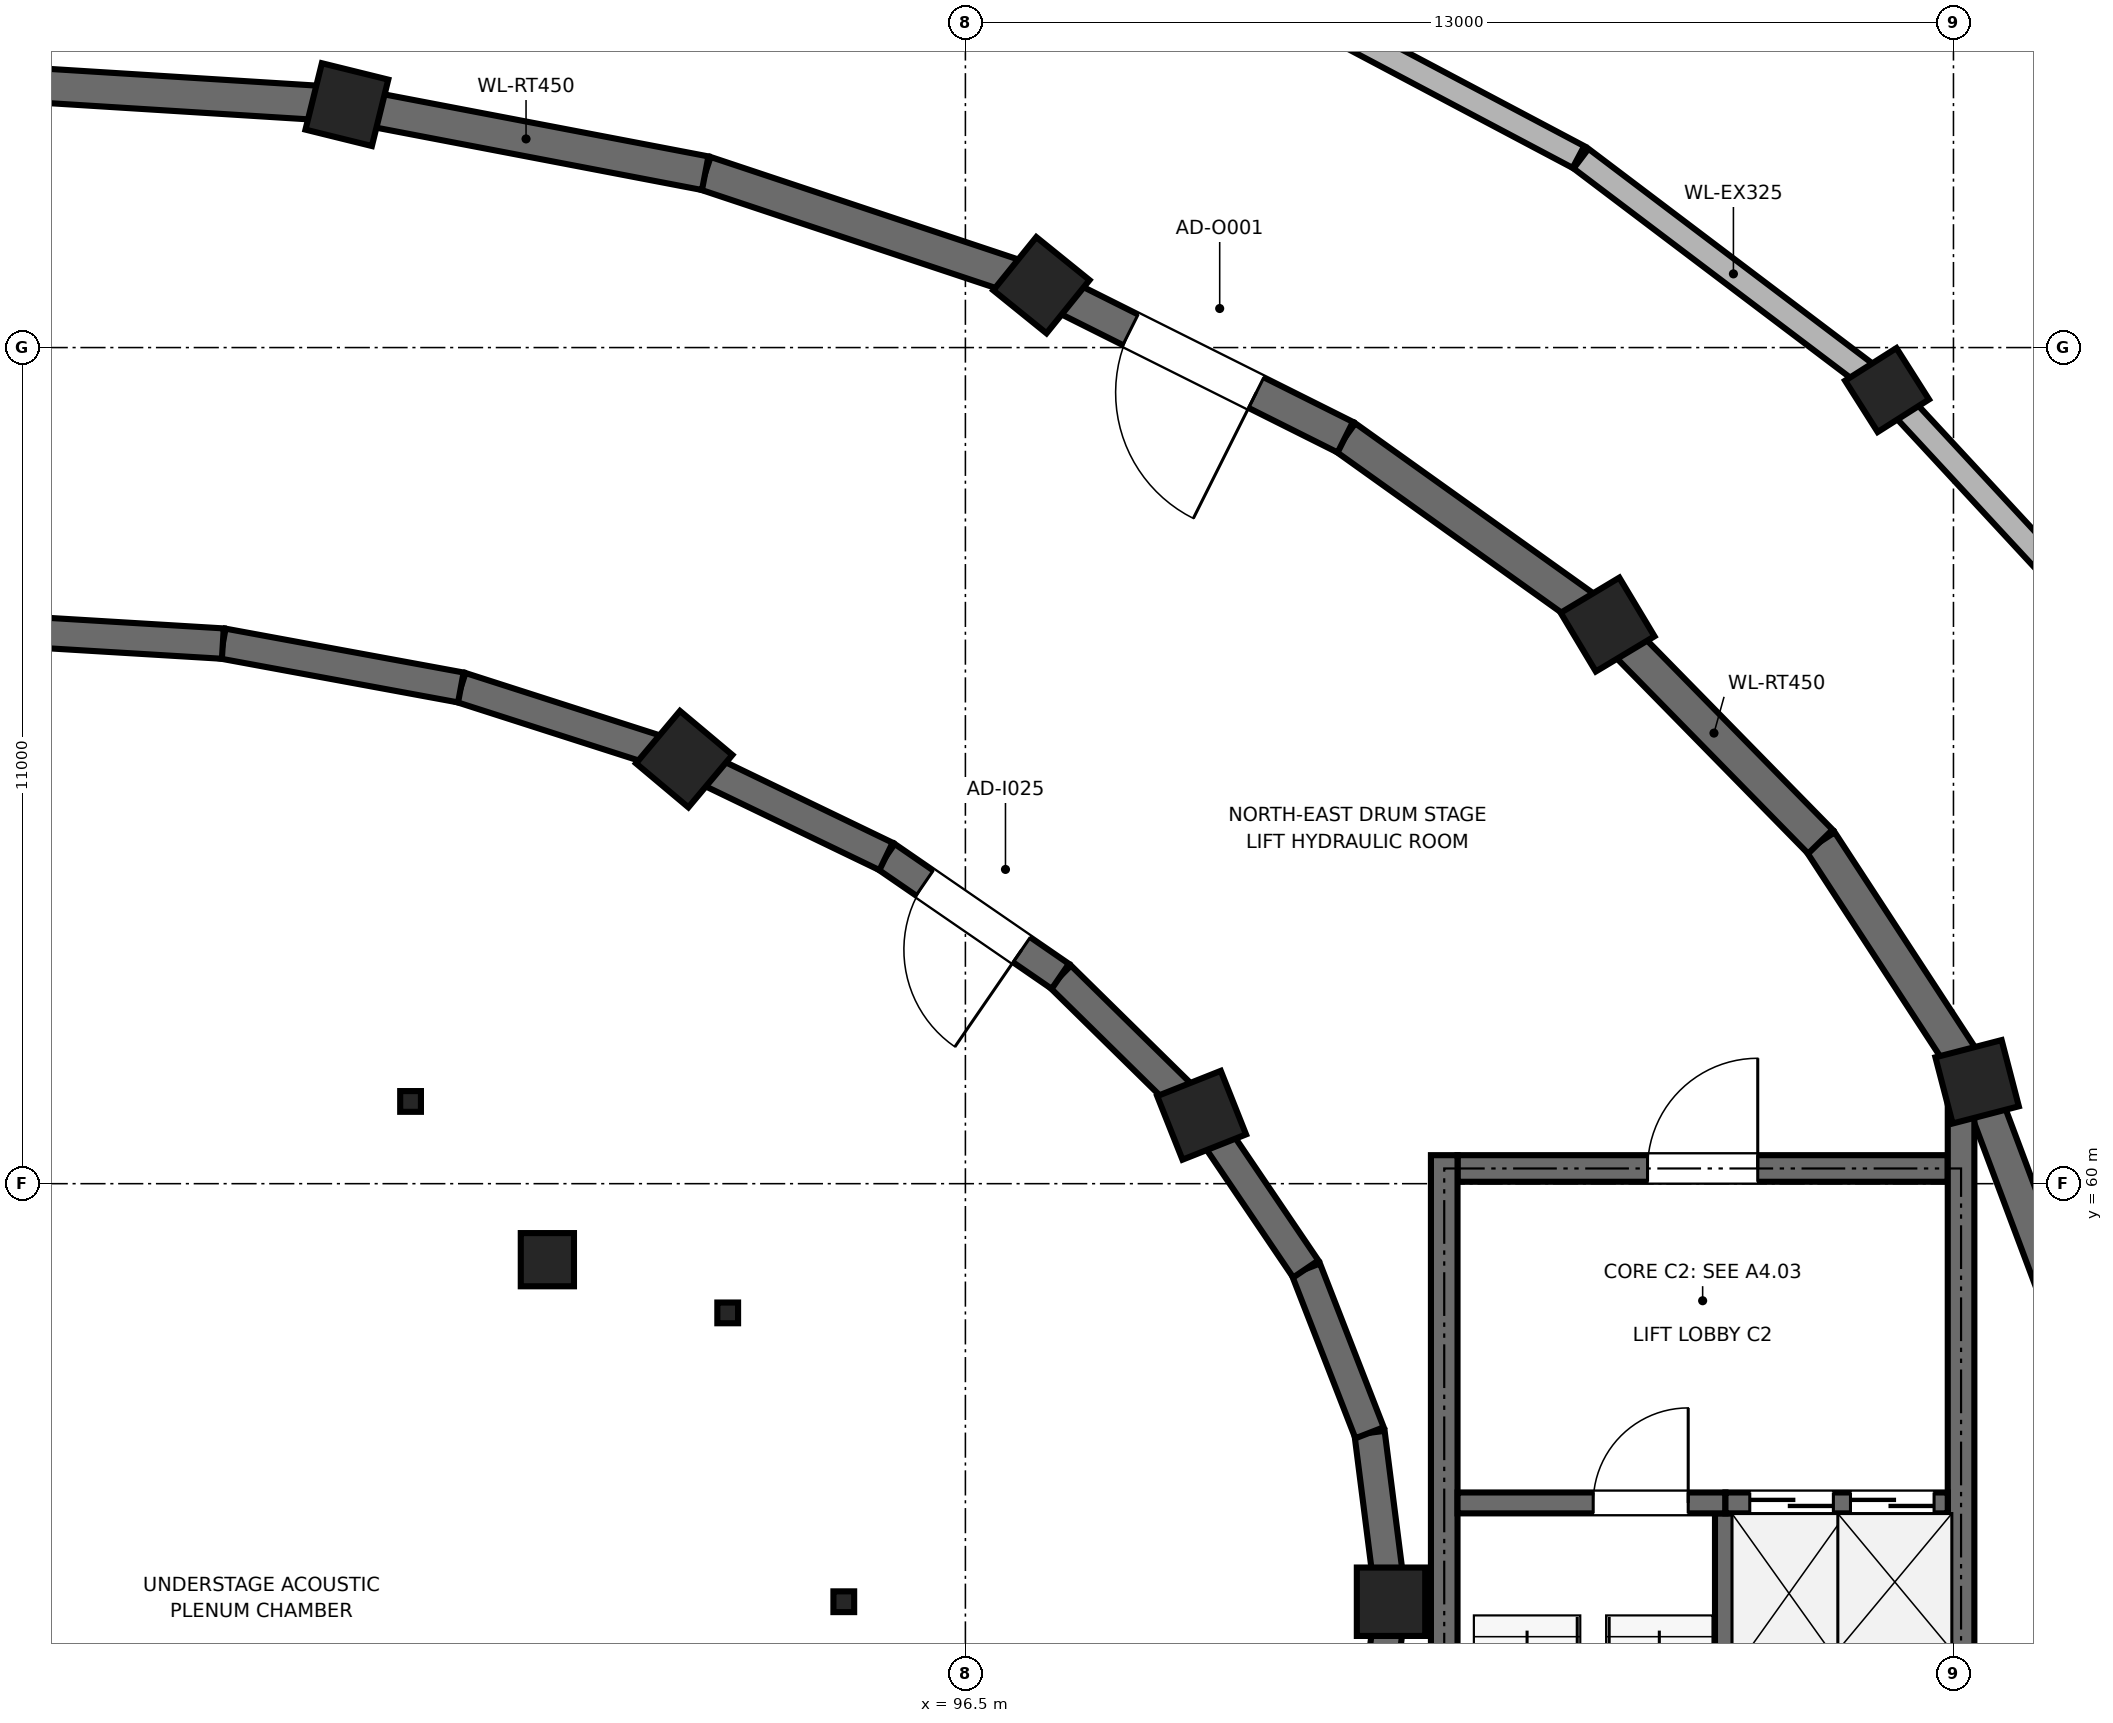
"""IFC4 building model, lengths in metres.
Left out: names, types, materials, properties, quantities, classifications, styles, units other than length and angle.
Written with IfcOpenShell. Run it as: python <this file> out.ifc"""

import sys

from ifc_helpers import new_model, si_unit, direction, frame, frame_2d, origin, origin_2d, place, context, subcontext, project, spatial, rectangle, circle, hollow_circle, extrude, element, fill, save


model = new_model("IFC4")
c1 = context("Model", 3, precision=1e-05, world=origin(), true_north=direction((0.0, 1.0)))
c2 = subcontext(c1, "Body", "Model", "MODEL_VIEW")
j1 = project(units=[si_unit("LENGTHUNIT", "METRE"), si_unit("PLANEANGLEUNIT", "RADIAN")], contexts=[c1])
p1 = place(None, origin())
s1 = spatial("IfcSite", under=j1, at=p1, CompositionType="ELEMENT")
p2 = place(p1, origin())
s2 = spatial("IfcBuilding", under=s1, at=p2, CompositionType="ELEMENT")
p3 = place(p2, frame((0.0, 0.0, -4.8)))
s3 = spatial("IfcBuildingStorey", under=s2, at=p3, CompositionType="ELEMENT", Elevation=-4.8)
p4 = place(p3, frame((108.626, 70.441, 0.0), z_axis=(0.0, 0.0, 1.0), x_axis=(0.84442143206, 0.535679423796, 0.0)))
e1 = element("IfcColumn", 1, at=p4, inside=s3, PredefinedType="COLUMN", context=c2, shape_type="SweptSolid", body=[
    extrude(circle(Radius=0.4, at=origin_2d()), origin(), (0.0, 0.0, 1.0), 4.8),
])
for number, where, z_axis, x_axis in (
    (2, (109.811, 61.34, 0.0), (0.0, 0.0, 1.0), (0.968, 0.252, 0.0)),
    (3, (104.949, 67.356, 0.0), (0.0, 0.0, 1.0), (0.858, 0.514, 0.0)),
    (4, (97.5, 71.821, 0.0), (0.0, 0.0, 1.0), (0.629, 0.778, 0.0)),
    (5, (88.362, 74.196, 0.0), (0.0, 0.0, 1.0), (0.24, 0.971, 0.0)),
):
    element("IfcColumn", number, at=place(p3, frame(where, z_axis=z_axis, x_axis=x_axis)), inside=s3, PredefinedType="COLUMN", context=c2, shape_type="SweptSolid", body=[
        extrude(rectangle(XDim=0.9, YDim=0.9, at=origin_2d()), origin(), (0.0, 0.0, 1.0), 4.8),
    ])
for number, where, z_axis, x_axis in (
    (6, (102.1, 54.5, 0.0), (0.0, 0.0, 1.0), (1.0, 0.0, 0.0)),
    (7, (99.608, 60.9, 0.0), (0.0, 0.0, 1.0), (0.929, 0.369, 0.0)),
    (8, (92.8, 65.585, 0.0), (0.0, 0.0, 1.0), (0.643, 0.766, 0.0)),
):
    element("IfcColumn", number, at=place(p3, frame(where, z_axis=z_axis, x_axis=x_axis)), inside=s3, PredefinedType="COLUMN", context=c2, shape_type="SweptSolid", body=[
        extrude(circle(Radius=0.45, at=origin_2d()), origin(), (0.0, 0.0, 1.0), 4.8),
    ])
p5 = place(p3, frame((91.0, 59.0, 0.0), z_axis=(0.0, 0.0, 1.0), x_axis=(1.0, 0.0, 0.0)))
e9 = element("IfcColumn", 9, at=p5, inside=s3, PredefinedType="COLUMN", context=c2, shape_type="SweptSolid", body=[
    extrude(rectangle(XDim=0.7, YDim=0.7, at=origin_2d()), origin(), (0.0, 0.0, 1.0), 4.8),
])
p6 = place(p3, frame((111.075, 57.973, 0.0), z_axis=(0.0, 0.0, 1.0), x_axis=(-0.351279653979, 0.936270583058, 0.0)))
e10 = element("IfcWall", 10, at=p6, inside=s3, PredefinedType="SHEAR", context=c2, shape_type="SweptSolid", body=[
    extrude(rectangle(XDim=3.597, YDim=0.45, at=frame_2d((1.798, 0.0))), origin(), (0.0, 0.0, 1.0), 4.5),
])
p7 = place(p3, frame((109.811, 61.34, 0.0), z_axis=(0.0, 0.0, 1.0), x_axis=(-0.546611158382, 0.837386554425, 0.0)))
e11 = element("IfcWall", 11, at=p7, inside=s3, PredefinedType="SHEAR", context=c2, shape_type="SweptSolid", body=[
    extrude(rectangle(XDim=3.773, YDim=0.45, at=frame_2d((1.887, 0.0))), origin(), (0.0, 0.0, 1.0), 4.5),
])
p8 = place(p3, frame((107.749, 64.5, 0.0), z_axis=(0.0, 0.0, 1.0), x_axis=(-0.700051268358, 0.714092586203, 0.0)))
e12 = element("IfcWall", 12, at=p8, inside=s3, PredefinedType="SHEAR", context=c2, shape_type="SweptSolid", body=[
    extrude(rectangle(XDim=3.999, YDim=0.45, at=frame_2d((2.0, 0.0))), origin(), (0.0, 0.0, 1.0), 4.5),
])
p9 = place(p3, frame((104.949, 67.356, 0.0), z_axis=(0.0, 0.0, 1.0), x_axis=(-0.813737360708, 0.581232748378, 0.0)))
e13 = element("IfcWall", 13, at=p9, inside=s3, PredefinedType="SHEAR", context=c2, shape_type="SweptSolid", body=[
    extrude(rectangle(XDim=4.241, YDim=0.45, at=frame_2d((2.121, 0.0))), origin(), (0.0, 0.0, 1.0), 4.5),
])
p10 = place(p3, frame((101.498, 69.821, 0.0), z_axis=(0.0, 0.0, 1.0), x_axis=(-0.894361644392, 0.447344664705, 0.0)))
e14 = element("IfcWall", 14, at=p10, inside=s3, PredefinedType="SHEAR", context=c2, shape_type="SweptSolid", body=[
    extrude(rectangle(XDim=4.47, YDim=0.45, at=frame_2d((2.235, 0.0))), origin(), (0.0, 0.0, 1.0), 4.5),
])
p11 = place(p10, frame((1.31, 0.0, 0.0)))
e15 = element("IfcOpeningElement", 15, at=p11, cuts=e14, PredefinedType="OPENING", context=c2, shape_type="SweptSolid", body=[
    extrude(rectangle(XDim=1.85, YDim=2.3, at=frame_2d((0.925, 1.15))), frame((0.0, 0.235, 0.0), z_axis=(0.0, -1.0, 0.0), x_axis=(1.0, 0.0, 0.0)), (0.0, 0.0, 1.0), 0.47),
])
p12 = place(p3, frame((97.5, 71.821, 0.0), z_axis=(0.0, 0.0, 1.0), x_axis=(-0.948751350732, 0.316023534699, 0.0)))
e16 = element("IfcWall", 16, at=p12, inside=s3, PredefinedType="SHEAR", context=c2, shape_type="SweptSolid", body=[
    extrude(rectangle(XDim=4.662, YDim=0.45, at=frame_2d((2.331, 0.0))), origin(), (0.0, 0.0, 1.0), 4.5),
])
p13 = place(p3, frame((93.077, 73.294, 0.0), z_axis=(0.0, 0.0, 1.0), x_axis=(-0.982172578083, 0.187981453503, 0.0)))
e17 = element("IfcWall", 17, at=p13, inside=s3, PredefinedType="SHEAR", context=c2, shape_type="SweptSolid", body=[
    extrude(rectangle(XDim=4.8, YDim=0.45, at=frame_2d((2.4, 0.0))), origin(), (0.0, 0.0, 1.0), 4.5),
])
p14 = place(p3, frame((88.362, 74.196, 0.0), z_axis=(0.0, 0.0, 1.0), x_axis=(-0.998054722924, 0.06234396562, 0.0)))
e18 = element("IfcWall", 18, at=p14, inside=s3, PredefinedType="SHEAR", context=c2, shape_type="SweptSolid", body=[
    extrude(rectangle(XDim=4.872, YDim=0.45, at=frame_2d((2.436, 0.0))), origin(), (0.0, 0.0, 1.0), 4.5),
])
p15 = place(p3, frame((102.1, 54.5, 0.0), z_axis=(0.0, 0.0, 1.0), x_axis=(-0.126180195213, 0.992007337844, 0.0)))
e19 = element("IfcWall", 19, at=p15, inside=s3, PredefinedType="SOLIDWALL", context=c2, shape_type="SweptSolid", body=[
    extrude(rectangle(XDim=2.24, YDim=0.4, at=frame_2d((1.12, 0.0))), origin(), (0.0, 0.0, 1.0), 4.5),
])
p16 = place(p3, frame((101.817, 56.723, 0.0), z_axis=(0.0, 0.0, 1.0), x_axis=(-0.362802811216, 0.931865934657, 0.0)))
e20 = element("IfcWall", 20, at=p16, inside=s3, PredefinedType="SOLIDWALL", context=c2, shape_type="SweptSolid", body=[
    extrude(rectangle(XDim=2.313, YDim=0.4, at=frame_2d((1.156, 0.0))), origin(), (0.0, 0.0, 1.0), 4.5),
])
p17 = place(p3, frame((100.978, 58.878, 0.0), z_axis=(0.0, 0.0, 1.0), x_axis=(-0.560958648975, 0.827843822312, 0.0)))
e21 = element("IfcWall", 21, at=p17, inside=s3, PredefinedType="SOLIDWALL", context=c2, shape_type="SweptSolid", body=[
    extrude(rectangle(XDim=2.442, YDim=0.4, at=frame_2d((1.221, 0.0))), origin(), (0.0, 0.0, 1.0), 4.5),
])
p18 = place(p3, frame((99.608, 60.9, 0.0), z_axis=(0.0, 0.0, 1.0), x_axis=(-0.713212431679, 0.700947949065, 0.0)))
e22 = element("IfcWall", 22, at=p18, inside=s3, PredefinedType="SOLIDWALL", context=c2, shape_type="SweptSolid", body=[
    extrude(rectangle(XDim=2.608, YDim=0.4, at=frame_2d((1.304, 0.0))), origin(), (0.0, 0.0, 1.0), 4.5),
])
p19 = place(p3, frame((97.748, 62.728, 0.0), z_axis=(0.0, 0.0, 1.0), x_axis=(-0.823780742291, 0.566908536388, 0.0)))
e23 = element("IfcWall", 23, at=p19, inside=s3, PredefinedType="SOLIDWALL", context=c2, shape_type="SweptSolid", body=[
    extrude(rectangle(XDim=2.783, YDim=0.4, at=frame_2d((1.392, 0.0))), origin(), (0.0, 0.0, 1.0), 4.5),
])
p20 = place(p19, frame((0.616, 0.0, 0.0)))
e24 = element("IfcOpeningElement", 24, at=p20, cuts=e23, PredefinedType="OPENING", context=c2, shape_type="SweptSolid", body=[
    extrude(rectangle(XDim=1.55, YDim=2.18, at=frame_2d((0.775, 1.09))), frame((0.0, 0.21, 0.0), z_axis=(0.0, -1.0, 0.0), x_axis=(1.0, 0.0, 0.0)), (0.0, 0.0, 1.0), 0.42),
])
p21 = place(p3, frame((95.456, 64.305, 0.0), z_axis=(0.0, 0.0, 1.0), x_axis=(-0.900857755122, 0.434114391648, 0.0)))
e25 = element("IfcWall", 25, at=p21, inside=s3, PredefinedType="SOLIDWALL", context=c2, shape_type="SweptSolid", body=[
    extrude(rectangle(XDim=2.948, YDim=0.4, at=frame_2d((1.474, 0.0))), origin(), (0.0, 0.0, 1.0), 4.5),
])
p22 = place(p3, frame((92.8, 65.585, 0.0), z_axis=(0.0, 0.0, 1.0), x_axis=(-0.952183186678, 0.305527705795, 0.0)))
e26 = element("IfcWall", 26, at=p22, inside=s3, PredefinedType="SOLIDWALL", context=c2, shape_type="SweptSolid", body=[
    extrude(rectangle(XDim=3.086, YDim=0.4, at=frame_2d((1.543, 0.0))), origin(), (0.0, 0.0, 1.0), 4.5),
])
p23 = place(p3, frame((89.862, 66.528, 0.0), z_axis=(0.0, 0.0, 1.0), x_axis=(-0.9834240594, 0.18132048807, 0.0)))
e27 = element("IfcWall", 27, at=p23, inside=s3, PredefinedType="SOLIDWALL", context=c2, shape_type="SweptSolid", body=[
    extrude(rectangle(XDim=3.184, YDim=0.4, at=frame_2d((1.592, 0.0))), origin(), (0.0, 0.0, 1.0), 4.5),
])
p24 = place(p3, frame((86.73, 67.105, 0.0), z_axis=(0.0, 0.0, 1.0), x_axis=(-0.99819038223, 0.060132859761, 0.0)))
e28 = element("IfcWall", 28, at=p24, inside=s3, PredefinedType="SOLIDWALL", context=c2, shape_type="SweptSolid", body=[
    extrude(rectangle(XDim=3.236, YDim=0.4, at=frame_2d((1.618, 0.0))), origin(), (0.0, 0.0, 1.0), 4.5),
])
p25 = place(p3, frame((101.817, 52.277, 0.0), z_axis=(0.0, 0.0, 1.0), x_axis=(0.126180195213, 0.992007337844, 0.0)))
e29 = element("IfcWall", 29, at=p25, inside=s3, PredefinedType="SOLIDWALL", context=c2, shape_type="SweptSolid", body=[
    extrude(rectangle(XDim=2.24, YDim=0.4, at=frame_2d((1.12, 0.0))), origin(), (0.0, 0.0, 1.0), 4.5),
])
for number, where, z_axis, x_axis in (
    (30, (94.9, 54.5, 0.0), (0.0, 0.0, 1.0), (1.0, 0.0, 0.0)),
    (31, (93.373, 58.3, 0.0), (0.0, 0.0, 1.0), (1.0, 0.0, 0.0)),
    (32, (89.2, 61.082, 0.0), (0.0, 0.0, 1.0), (1.0, 0.0, 0.0)),
):
    element("IfcColumn", number, at=place(p3, frame(where, z_axis=z_axis, x_axis=x_axis)), inside=s3, PredefinedType="COLUMN", context=c2, shape_type="SweptSolid", body=[
        extrude(hollow_circle(Radius=0.136, WallThickness=0.016, at=origin_2d()), origin(), (0.0, 0.0, 1.0), 4.8),
    ])
p26 = place(p3, frame((108.64, 70.427, 0.0), z_axis=(0.0, 0.0, 1.0), x_axis=(0.679476177226, -0.733697570244, 0.0)))
e33 = element("IfcWall", 33, at=p26, inside=s3, PredefinedType="SOLIDWALL", context=c2, shape_type="SweptSolid", body=[
    extrude(rectangle(XDim=4.786, YDim=0.325, at=frame_2d((2.393, 0.0))), origin(), (0.0, 0.0, 1.0), 3.95),
])
p27 = place(p3, frame((104.599, 73.486, 0.0), z_axis=(0.0, 0.0, 1.0), x_axis=(0.797657622226, -0.60311053523, 0.0)))
e34 = element("IfcWall", 34, at=p27, inside=s3, PredefinedType="SOLIDWALL", context=c2, shape_type="SweptSolid", body=[
    extrude(rectangle(XDim=5.029, YDim=0.325, at=frame_2d((2.514, 0.0))), origin(), (0.0, 0.0, 1.0), 3.95),
])
p28 = place(p3, frame((99.918, 75.968, 0.0), z_axis=(0.0, 0.0, 1.0), x_axis=(0.883786787155, -0.467889853332, 0.0)))
e35 = element("IfcWall", 35, at=p28, inside=s3, PredefinedType="SOLIDWALL", context=c2, shape_type="SweptSolid", body=[
    extrude(rectangle(XDim=5.259, YDim=0.325, at=frame_2d((2.629, 0.0))), origin(), (0.0, 0.0, 1.0), 3.95),
])
p29 = place(p3, frame((102.975, 60.2, 0.0), z_axis=(0.0, 0.0, 1.0), x_axis=(1.0, 0.0, 0.0)))
e36 = element("IfcWall", 36, at=p29, inside=s3, PredefinedType="SHEAR", context=c2, shape_type="SweptSolid", body=[
    extrude(rectangle(XDim=6.45, YDim=0.35, at=frame_2d((3.225, 0.0))), origin(), (0.0, 0.0, 1.0), 4.5),
])
p30 = place(p29, frame((2.5, 0.0, 0.0)))
e37 = element("IfcOpeningElement", 37, at=p30, cuts=e36, PredefinedType="OPENING", context=c2, shape_type="SweptSolid", body=[
    extrude(rectangle(XDim=1.45, YDim=2.2, at=frame_2d((0.725, 1.1))), frame((0.0, 0.185, 0.0), z_axis=(0.0, -1.0, 0.0), x_axis=(1.0, 0.0, 0.0)), (0.0, 0.0, 1.0), 0.37),
])
p31 = place(p3, frame((102.8, 48.775, 0.0), z_axis=(0.0, 0.0, 1.0), x_axis=(0.0, 1.0, 0.0)))
e38 = element("IfcWall", 38, at=p31, inside=s3, PredefinedType="SHEAR", context=c2, shape_type="SweptSolid", body=[
    extrude(rectangle(XDim=11.6, YDim=0.35, at=frame_2d((5.8, 0.0))), origin(), (0.0, 0.0, 1.0), 4.5),
])
p32 = place(p3, frame((109.6, 48.775, 0.0), z_axis=(0.0, 0.0, 1.0), x_axis=(0.0, 1.0, 0.0)))
e39 = element("IfcWall", 39, at=p32, inside=s3, PredefinedType="SHEAR", context=c2, shape_type="SweptSolid", body=[
    extrude(rectangle(XDim=12.565, YDim=0.35, at=frame_2d((6.283, 0.0))), origin(), (0.0, 0.0, 1.0), 4.5),
])
p33 = place(p3, frame((106.5, 48.775, 0.0), z_axis=(0.0, 0.0, 1.0), x_axis=(0.0, 1.0, 0.0)))
e40 = element("IfcWall", 40, at=p33, inside=s3, PredefinedType="SHEAR", context=c2, shape_type="SweptSolid", body=[
    extrude(rectangle(XDim=6.888, YDim=0.275, at=frame_2d((3.444, 0.0))), origin(), (0.0, 0.0, 1.0), 4.5),
])
p34 = place(p3, frame((102.975, 55.8, 0.0), z_axis=(0.0, 0.0, 1.0), x_axis=(1.0, 0.0, 0.0)))
e41 = element("IfcWall", 41, at=p34, inside=s3, PredefinedType="SHEAR", context=c2, shape_type="SweptSolid", body=[
    extrude(rectangle(XDim=3.525, YDim=0.275, at=frame_2d((1.762, 0.0))), origin(), (0.0, 0.0, 1.0), 4.5),
])
p35 = place(p34, frame((1.785, 0.0, 0.0)))
e42 = element("IfcOpeningElement", 42, at=p35, cuts=e41, PredefinedType="OPENING", context=c2, shape_type="SweptSolid", body=[
    extrude(rectangle(XDim=1.25, YDim=2.15, at=frame_2d((0.625, 1.075))), frame((0.0, 0.147, 0.0), z_axis=(0.0, -1.0, 0.0), x_axis=(1.0, 0.0, 0.0)), (0.0, 0.0, 1.0), 0.295),
])
p36 = place(p3, frame((106.5, 55.8, 0.0), z_axis=(0.0, 0.0, 1.0), x_axis=(1.0, 0.0, 0.0)))
e43 = element("IfcWall", 43, at=p36, inside=s3, PredefinedType="SHEAR", context=c2, shape_type="SweptSolid", body=[
    extrude(rectangle(XDim=2.925, YDim=0.275, at=frame_2d((1.462, 0.0))), origin(), (0.0, 0.0, 1.0), 4.5),
])
p37 = place(p36, frame((0.32, 0.0, 0.0)))
e44 = element("IfcOpeningElement", 44, at=p37, cuts=e43, PredefinedType="OPENING", context=c2, shape_type="SweptSolid", body=[
    extrude(rectangle(XDim=1.1, YDim=2.15, at=frame_2d((0.55, 1.075))), frame((0.0, 0.147, 0.0), z_axis=(0.0, -1.0, 0.0), x_axis=(1.0, 0.0, 0.0)), (0.0, 0.0, 1.0), 0.295),
])
p38 = place(p36, frame((1.645, 0.0, 0.0)))
e45 = element("IfcOpeningElement", 45, at=p38, cuts=e43, PredefinedType="OPENING", context=c2, shape_type="SweptSolid", body=[
    extrude(rectangle(XDim=1.1, YDim=2.15, at=frame_2d((0.55, 1.075))), frame((0.0, 0.147, 0.0), z_axis=(0.0, -1.0, 0.0), x_axis=(1.0, 0.0, 0.0)), (0.0, 0.0, 1.0), 0.295),
])
p39 = place(p3, frame((108.032, 48.775, 0.0), z_axis=(0.0, 0.0, 1.0), x_axis=(0.0, 1.0, 0.0)))
e46 = element("IfcWall", 46, at=p39, inside=s3, PredefinedType="PARTITIONING", context=c2, shape_type="SweptSolid", body=[
    extrude(rectangle(XDim=6.825, YDim=0.15, at=frame_2d((3.413, 0.0))), origin(), (0.0, 0.0, 1.0), 4.494),
])
p40 = place(p35, origin())
e47 = element("IfcDoor", 47, at=p40, inside=s3, OperationType="SINGLE_SWING_RIGHT", PredefinedType="DOOR", context=c2, shape_type="SweptSolid", body=[
    extrude(rectangle(XDim=1.25, YDim=2.15, at=frame_2d((0.625, 1.075))), frame((0.0, 0.025, 0.0), z_axis=(0.0, -1.0, 0.0), x_axis=(1.0, 0.0, 0.0)), (0.0, 0.0, 1.0), 0.05),
])
fill(e42, e47)
p41 = place(p37, origin())
e48 = element("IfcDoor", 48, at=p41, inside=s3, OperationType="DOUBLE_DOOR_SLIDING", PredefinedType="DOOR", context=c2, shape_type="SweptSolid", body=[
    extrude(rectangle(XDim=1.1, YDim=2.15, at=frame_2d((0.55, 1.075))), frame((0.0, 0.025, 0.0), z_axis=(0.0, -1.0, 0.0), x_axis=(1.0, 0.0, 0.0)), (0.0, 0.0, 1.0), 0.05),
])
fill(e44, e48)
p42 = place(p38, origin())
e49 = element("IfcDoor", 49, at=p42, inside=s3, OperationType="DOUBLE_DOOR_SLIDING", PredefinedType="DOOR", context=c2, shape_type="SweptSolid", body=[
    extrude(rectangle(XDim=1.1, YDim=2.15, at=frame_2d((0.55, 1.075))), frame((0.0, 0.025, 0.0), z_axis=(0.0, -1.0, 0.0), x_axis=(1.0, 0.0, 0.0)), (0.0, 0.0, 1.0), 0.05),
])
fill(e45, e49)
p43 = place(p30, origin())
e50 = element("IfcDoor", 50, at=p43, inside=s3, OperationType="SINGLE_SWING_RIGHT", PredefinedType="DOOR", context=c2, shape_type="SweptSolid", body=[
    extrude(rectangle(XDim=1.45, YDim=2.2, at=frame_2d((0.725, 1.1))), frame((0.0, 0.025, 0.0), z_axis=(0.0, -1.0, 0.0), x_axis=(1.0, 0.0, 0.0)), (0.0, 0.0, 1.0), 0.05),
])
fill(e37, e50)
p44 = place(p11, origin())
e51 = element("IfcDoor", 51, at=p44, inside=s3, OperationType="SINGLE_SWING_LEFT", PredefinedType="DOOR", context=c2, shape_type="SweptSolid", body=[
    extrude(rectangle(XDim=1.85, YDim=2.3, at=frame_2d((0.925, 1.15))), frame((0.0, 0.025, 0.0), z_axis=(0.0, -1.0, 0.0), x_axis=(1.0, 0.0, 0.0)), (0.0, 0.0, 1.0), 0.05),
])
fill(e15, e51)
p45 = place(p20, origin())
e52 = element("IfcDoor", 52, at=p45, inside=s3, OperationType="SINGLE_SWING_LEFT", PredefinedType="DOOR", context=c2, shape_type="SweptSolid", body=[
    extrude(rectangle(XDim=1.55, YDim=2.18, at=frame_2d((0.775, 1.09))), frame((0.0, 0.025, 0.0), z_axis=(0.0, -1.0, 0.0), x_axis=(1.0, 0.0, 0.0)), (0.0, 0.0, 1.0), 0.05),
])
fill(e24, e52)
save(model, sys.argv[1])
